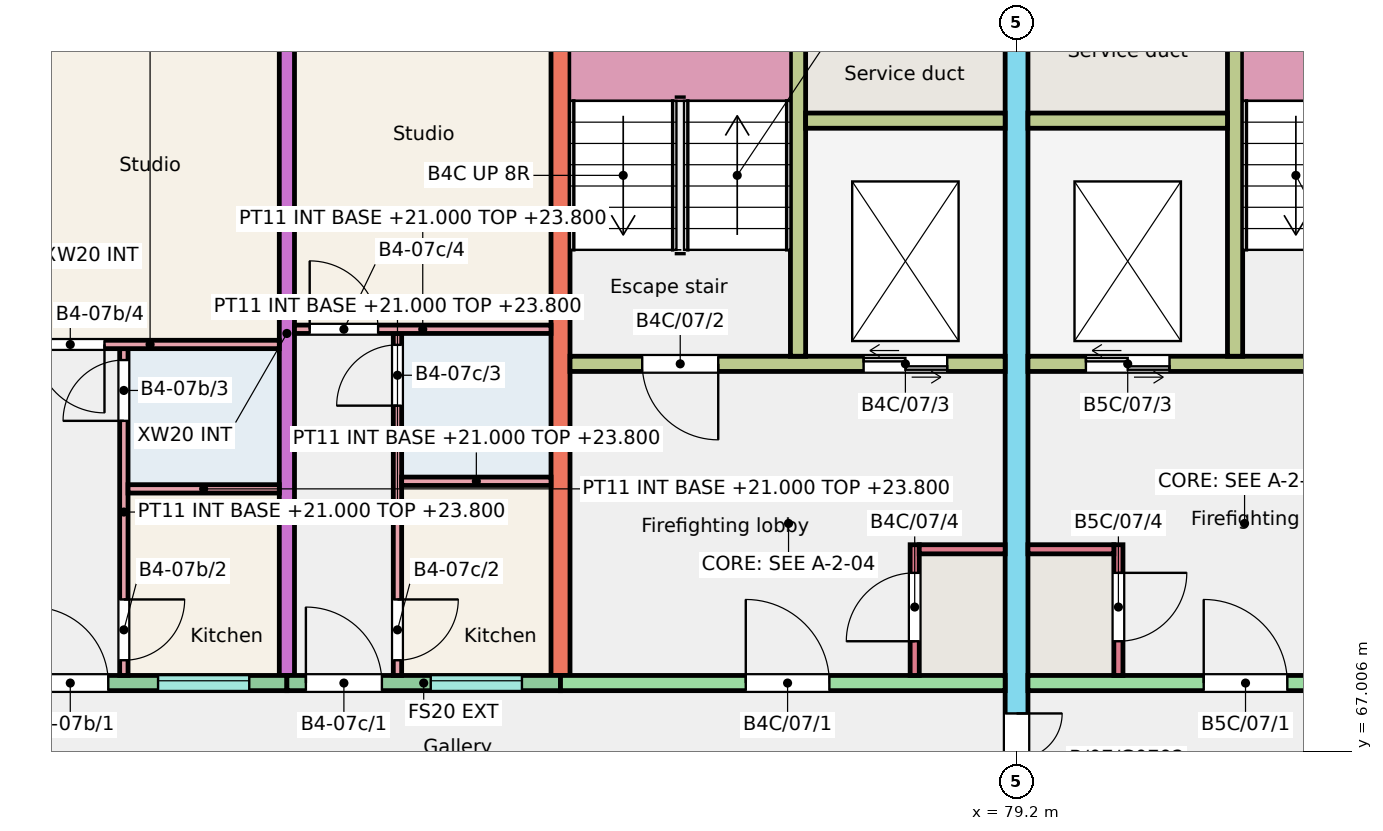
"""IFC4 building model, lengths in metres.
Left out: names, types, materials, properties, quantities, classifications, styles, units other than length and angle.
Written with IfcOpenShell. Run it as: python <this file> out.ifc"""

import sys

from ifc_helpers import new_model, si_unit, direction, frame, frame_2d, origin, place, context, subcontext, project, spatial, rectangle, extrude, element, fill, save


model = new_model("IFC4")
c1 = context("Model", 3, precision=1e-05, world=origin(), true_north=direction((0.0, 1.0)))
c2 = subcontext(c1, "Body", "Model", "MODEL_VIEW")
j1 = project(units=[si_unit("LENGTHUNIT", "METRE"), si_unit("PLANEANGLEUNIT", "RADIAN")], contexts=[c1])
p1 = place(None, origin())
s1 = spatial("IfcSite", under=j1, at=p1, CompositionType="ELEMENT")
p2 = place(p1, origin())
s2 = spatial("IfcBuilding", under=s1, at=p2, CompositionType="ELEMENT")
p3 = place(p2, frame((0.0, 0.0, 21.0)))
s3 = spatial("IfcBuildingStorey", under=s2, at=p3, CompositionType="ELEMENT", Elevation=21.0)
p4 = place(p3, frame((69.6, 68.0, 0.0), z_axis=(0.0, 0.0, 1.0), x_axis=(0.0, 1.0, 0.0)))
e1 = element("IfcWall", 1, at=p4, inside=s3, PredefinedType="SHEAR", context=c2, shape_type="SweptSolid", body=[
    extrude(rectangle(XDim=9.0, YDim=0.2, at=frame_2d((4.5, 0.0))), origin(), (0.0, 0.0, 1.0), 3.0),
])
p5 = place(p3, frame((73.2, 68.0, 0.0), z_axis=(0.0, 0.0, 1.0), x_axis=(0.0, 1.0, 0.0)))
e2 = element("IfcWall", 2, at=p5, inside=s3, PredefinedType="SHEAR", context=c2, shape_type="SweptSolid", body=[
    extrude(rectangle(XDim=9.0, YDim=0.25, at=frame_2d((4.5, 0.0))), origin(), (0.0, 0.0, 1.0), 3.0),
])
p6 = place(p3, frame((79.2, 66.0, 0.0), z_axis=(0.0, 0.0, 1.0), x_axis=(0.0, 1.0, 0.0)))
e3 = element("IfcWall", 3, at=p6, inside=s3, PredefinedType="SHEAR", context=c2, shape_type="SweptSolid", body=[
    extrude(rectangle(XDim=11.0, YDim=0.3, at=frame_2d((5.5, 0.0))), origin(), (0.0, 0.0, 1.0), 3.0),
])
p7 = place(p6, frame((0.3, 0.0, 0.0)))
e4 = element("IfcOpeningElement", 4, at=p7, cuts=e3, PredefinedType="OPENING", context=c2, shape_type="SweptSolid", body=[
    extrude(rectangle(XDim=1.2, YDim=2.1, at=frame_2d((0.6, 1.05))), frame((0.0, 0.16, 0.0), z_axis=(0.0, -1.0, 0.0), x_axis=(1.0, 0.0, 0.0)), (0.0, 0.0, 1.0), 0.32),
])
p8 = place(p3, frame((66.0, 67.9, 0.0), z_axis=(0.0, 0.0, 1.0), x_axis=(1.0, 0.0, 0.0)))
e5 = element("IfcWall", 5, at=p8, inside=s3, PredefinedType="SOLIDWALL", context=c2, shape_type="SweptSolid", body=[
    extrude(rectangle(XDim=3.6, YDim=0.2, at=frame_2d((1.8, 0.0))), origin(), (0.0, 0.0, 1.0), 3.0),
])
p9 = place(p8, frame((1.905, 0.0, 1.1)))
e6 = element("IfcOpeningElement", 6, at=p9, cuts=e5, PredefinedType="OPENING", context=c2, shape_type="SweptSolid", body=[
    extrude(rectangle(XDim=1.2, YDim=1.3, at=frame_2d((0.6, 0.65))), frame((0.0, 0.11, 0.0), z_axis=(0.0, -1.0, 0.0), x_axis=(1.0, 0.0, 0.0)), (0.0, 0.0, 1.0), 0.22),
])
p10 = place(p8, frame((0.25, 0.0, 0.0)))
e7 = element("IfcOpeningElement", 7, at=p10, cuts=e5, PredefinedType="OPENING", context=c2, shape_type="SweptSolid", body=[
    extrude(rectangle(XDim=1.0, YDim=2.1, at=frame_2d((0.5, 1.05))), frame((0.0, 0.11, 0.0), z_axis=(0.0, -1.0, 0.0), x_axis=(1.0, 0.0, 0.0)), (0.0, 0.0, 1.0), 0.22),
])
p11 = place(p3, frame((69.6, 67.9, 0.0), z_axis=(0.0, 0.0, 1.0), x_axis=(1.0, 0.0, 0.0)))
e8 = element("IfcWall", 8, at=p11, inside=s3, PredefinedType="SOLIDWALL", context=c2, shape_type="SweptSolid", body=[
    extrude(rectangle(XDim=3.6, YDim=0.2, at=frame_2d((1.8, 0.0))), origin(), (0.0, 0.0, 1.0), 3.0),
])
p12 = place(p11, frame((1.893, 0.0, 1.1)))
e9 = element("IfcOpeningElement", 9, at=p12, cuts=e8, PredefinedType="OPENING", context=c2, shape_type="SweptSolid", body=[
    extrude(rectangle(XDim=1.2, YDim=1.3, at=frame_2d((0.6, 0.65))), frame((0.0, 0.11, 0.0), z_axis=(0.0, -1.0, 0.0), x_axis=(1.0, 0.0, 0.0)), (0.0, 0.0, 1.0), 0.22),
])
p13 = place(p11, frame((0.25, 0.0, 0.0)))
e10 = element("IfcOpeningElement", 10, at=p13, cuts=e8, PredefinedType="OPENING", context=c2, shape_type="SweptSolid", body=[
    extrude(rectangle(XDim=1.0, YDim=2.1, at=frame_2d((0.5, 1.05))), frame((0.0, 0.11, 0.0), z_axis=(0.0, -1.0, 0.0), x_axis=(1.0, 0.0, 0.0)), (0.0, 0.0, 1.0), 0.22),
])
p14 = place(p3, frame((73.2, 67.9, 0.0), z_axis=(0.0, 0.0, 1.0), x_axis=(1.0, 0.0, 0.0)))
e11 = element("IfcWall", 11, at=p14, inside=s3, PredefinedType="SHEAR", context=c2, shape_type="SweptSolid", body=[
    extrude(rectangle(XDim=5.85, YDim=0.2, at=frame_2d((2.925, 0.0))), origin(), (0.0, 0.0, 1.0), 3.0),
])
p15 = place(p14, frame((2.438, 0.0, 0.0)))
e12 = element("IfcOpeningElement", 12, at=p15, cuts=e11, PredefinedType="OPENING", context=c2, shape_type="SweptSolid", body=[
    extrude(rectangle(XDim=1.1, YDim=2.1, at=frame_2d((0.55, 1.05))), frame((0.0, 0.11, 0.0), z_axis=(0.0, -1.0, 0.0), x_axis=(1.0, 0.0, 0.0)), (0.0, 0.0, 1.0), 0.22),
])
p16 = place(p3, frame((73.325, 72.1, 0.0), z_axis=(0.0, 0.0, 1.0), x_axis=(1.0, 0.0, 0.0)))
e13 = element("IfcWall", 13, at=p16, inside=s3, PredefinedType="SHEAR", context=c2, shape_type="SweptSolid", body=[
    extrude(rectangle(XDim=5.725, YDim=0.2, at=frame_2d((2.863, 0.0))), origin(), (0.0, 0.0, 1.0), 3.0),
])
p17 = place(p16, frame((0.95, 0.0, 0.0)))
e14 = element("IfcOpeningElement", 14, at=p17, cuts=e13, PredefinedType="OPENING", context=c2, shape_type="SweptSolid", body=[
    extrude(rectangle(XDim=1.0, YDim=2.1, at=frame_2d((0.5, 1.05))), frame((0.0, 0.11, 0.0), z_axis=(0.0, -1.0, 0.0), x_axis=(1.0, 0.0, 0.0)), (0.0, 0.0, 1.0), 0.22),
])
p18 = place(p16, frame((3.863, 0.0, 0.0)))
e15 = element("IfcOpeningElement", 15, at=p18, cuts=e13, PredefinedType="OPENING", context=c2, shape_type="SweptSolid", body=[
    extrude(rectangle(XDim=1.1, YDim=2.1, at=frame_2d((0.55, 1.05))), frame((0.0, 0.11, 0.0), z_axis=(0.0, -1.0, 0.0), x_axis=(1.0, 0.0, 0.0)), (0.0, 0.0, 1.0), 0.22),
])
p19 = place(p3, frame((76.325, 72.2, 0.0), z_axis=(0.0, 0.0, 1.0), x_axis=(0.0, 1.0, 0.0)))
e16 = element("IfcWall", 16, at=p19, inside=s3, PredefinedType="SHEAR", context=c2, shape_type="SweptSolid", body=[
    extrude(rectangle(XDim=4.8, YDim=0.2, at=frame_2d((2.4, 0.0))), origin(), (0.0, 0.0, 1.0), 3.0),
])
p20 = place(p3, frame((76.425, 75.3, 0.0), z_axis=(0.0, 0.0, 1.0), x_axis=(1.0, 0.0, 0.0)))
e17 = element("IfcWall", 17, at=p20, inside=s3, PredefinedType="SHEAR", context=c2, shape_type="SweptSolid", body=[
    extrude(rectangle(XDim=2.625, YDim=0.2, at=frame_2d((1.312, 0.0))), origin(), (0.0, 0.0, 1.0), 3.0),
])
p21 = place(p3, frame((77.86, 68.0, 0.0), z_axis=(0.0, 0.0, 1.0), x_axis=(0.0, 1.0, 0.0)))
e18 = element("IfcWall", 18, at=p21, inside=s3, PredefinedType="SHEAR", context=c2, shape_type="SweptSolid", body=[
    extrude(rectangle(XDim=1.72, YDim=0.12, at=frame_2d((0.86, 0.0))), origin(), (0.0, 0.0, 1.0), 3.0),
])
p22 = place(p21, frame((0.45, 0.0, 0.0)))
e19 = element("IfcOpeningElement", 19, at=p22, cuts=e18, PredefinedType="OPENING", context=c2, shape_type="SweptSolid", body=[
    extrude(rectangle(XDim=0.9, YDim=2.1, at=frame_2d((0.45, 1.05))), frame((0.0, 0.07, 0.0), z_axis=(0.0, -1.0, 0.0), x_axis=(1.0, 0.0, 0.0)), (0.0, 0.0, 1.0), 0.14),
])
p23 = place(p3, frame((77.92, 69.66, 0.0), z_axis=(0.0, 0.0, 1.0), x_axis=(1.0, 0.0, 0.0)))
e20 = element("IfcWall", 20, at=p23, inside=s3, PredefinedType="SHEAR", context=c2, shape_type="SweptSolid", body=[
    extrude(rectangle(XDim=1.13, YDim=0.12, at=frame_2d((0.565, 0.0))), origin(), (0.0, 0.0, 1.0), 3.0),
])
p24 = place(p3, frame((79.35, 67.9, 0.0), z_axis=(0.0, 0.0, 1.0), x_axis=(1.0, 0.0, 0.0)))
e21 = element("IfcWall", 21, at=p24, inside=s3, PredefinedType="SHEAR", context=c2, shape_type="SweptSolid", body=[
    extrude(rectangle(XDim=5.85, YDim=0.2, at=frame_2d((2.925, 0.0))), origin(), (0.0, 0.0, 1.0), 3.0),
])
p25 = place(p24, frame((2.312, 0.0, 0.0)))
e22 = element("IfcOpeningElement", 22, at=p25, cuts=e21, PredefinedType="OPENING", context=c2, shape_type="SweptSolid", body=[
    extrude(rectangle(XDim=1.1, YDim=2.1, at=frame_2d((0.55, 1.05))), frame((0.0, 0.11, 0.0), z_axis=(0.0, -1.0, 0.0), x_axis=(1.0, 0.0, 0.0)), (0.0, 0.0, 1.0), 0.22),
])
p26 = place(p3, frame((79.35, 72.1, 0.0), z_axis=(0.0, 0.0, 1.0), x_axis=(1.0, 0.0, 0.0)))
e23 = element("IfcWall", 23, at=p26, inside=s3, PredefinedType="SHEAR", context=c2, shape_type="SweptSolid", body=[
    extrude(rectangle(XDim=5.725, YDim=0.2, at=frame_2d((2.862, 0.0))), origin(), (0.0, 0.0, 1.0), 3.0),
])
p27 = place(p26, frame((3.775, 0.0, 0.0)))
e24 = element("IfcOpeningElement", 24, at=p27, cuts=e23, PredefinedType="OPENING", context=c2, shape_type="SweptSolid", body=[
    extrude(rectangle(XDim=1.0, YDim=2.1, at=frame_2d((0.5, 1.05))), frame((0.0, 0.11, 0.0), z_axis=(0.0, -1.0, 0.0), x_axis=(1.0, 0.0, 0.0)), (0.0, 0.0, 1.0), 0.22),
])
p28 = place(p26, frame((0.762, 0.0, 0.0)))
e25 = element("IfcOpeningElement", 25, at=p28, cuts=e23, PredefinedType="OPENING", context=c2, shape_type="SweptSolid", body=[
    extrude(rectangle(XDim=1.1, YDim=2.1, at=frame_2d((0.55, 1.05))), frame((0.0, 0.11, 0.0), z_axis=(0.0, -1.0, 0.0), x_axis=(1.0, 0.0, 0.0)), (0.0, 0.0, 1.0), 0.22),
])
p29 = place(p3, frame((82.075, 72.2, 0.0), z_axis=(0.0, 0.0, 1.0), x_axis=(0.0, 1.0, 0.0)))
e26 = element("IfcWall", 26, at=p29, inside=s3, PredefinedType="SHEAR", context=c2, shape_type="SweptSolid", body=[
    extrude(rectangle(XDim=4.8, YDim=0.2, at=frame_2d((2.4, 0.0))), origin(), (0.0, 0.0, 1.0), 3.0),
])
p30 = place(p3, frame((79.35, 75.3, 0.0), z_axis=(0.0, 0.0, 1.0), x_axis=(1.0, 0.0, 0.0)))
e27 = element("IfcWall", 27, at=p30, inside=s3, PredefinedType="SHEAR", context=c2, shape_type="SweptSolid", body=[
    extrude(rectangle(XDim=2.625, YDim=0.2, at=frame_2d((1.312, 0.0))), origin(), (0.0, 0.0, 1.0), 3.0),
])
p31 = place(p3, frame((80.54, 68.0, 0.0), z_axis=(0.0, 0.0, 1.0), x_axis=(0.0, 1.0, 0.0)))
e28 = element("IfcWall", 28, at=p31, inside=s3, PredefinedType="SHEAR", context=c2, shape_type="SweptSolid", body=[
    extrude(rectangle(XDim=1.72, YDim=0.12, at=frame_2d((0.86, 0.0))), origin(), (0.0, 0.0, 1.0), 3.0),
])
p32 = place(p31, frame((0.45, 0.0, 0.0)))
e29 = element("IfcOpeningElement", 29, at=p32, cuts=e28, PredefinedType="OPENING", context=c2, shape_type="SweptSolid", body=[
    extrude(rectangle(XDim=0.9, YDim=2.1, at=frame_2d((0.45, 1.05))), frame((0.0, 0.07, 0.0), z_axis=(0.0, -1.0, 0.0), x_axis=(1.0, 0.0, 0.0)), (0.0, 0.0, 1.0), 0.14),
])
p33 = place(p3, frame((79.35, 69.66, 0.0), z_axis=(0.0, 0.0, 1.0), x_axis=(1.0, 0.0, 0.0)))
e30 = element("IfcWall", 30, at=p33, inside=s3, PredefinedType="SHEAR", context=c2, shape_type="SweptSolid", body=[
    extrude(rectangle(XDim=1.13, YDim=0.12, at=frame_2d((0.565, 0.0))), origin(), (0.0, 0.0, 1.0), 3.0),
])
p34 = place(p3, frame((67.455, 68.0, 0.0), z_axis=(0.0, 0.0, 1.0), x_axis=(0.0, 1.0, 0.0)))
e31 = element("IfcWall", 31, at=p34, inside=s3, PredefinedType="PARTITIONING", context=c2, shape_type="SweptSolid", body=[
    extrude(rectangle(XDim=4.3, YDim=0.11, at=frame_2d((2.15, 0.0))), origin(), (0.0, 0.0, 1.0), 2.8),
])
p35 = place(p34, frame((0.2, 0.0, 0.0)))
e32 = element("IfcOpeningElement", 32, at=p35, cuts=e31, PredefinedType="OPENING", context=c2, shape_type="SweptSolid", body=[
    extrude(rectangle(XDim=0.8, YDim=2.1, at=frame_2d((0.4, 1.05))), frame((0.0, 0.065, 0.0), z_axis=(0.0, -1.0, 0.0), x_axis=(1.0, 0.0, 0.0)), (0.0, 0.0, 1.0), 0.13),
])
p36 = place(p34, frame((3.35, 0.0, 0.0)))
e33 = element("IfcOpeningElement", 33, at=p36, cuts=e31, PredefinedType="OPENING", context=c2, shape_type="SweptSolid", body=[
    extrude(rectangle(XDim=0.8, YDim=2.1, at=frame_2d((0.4, 1.05))), frame((0.0, 0.065, 0.0), z_axis=(0.0, -1.0, 0.0), x_axis=(1.0, 0.0, 0.0)), (0.0, 0.0, 1.0), 0.13),
])
p37 = place(p3, frame((67.51, 70.455, 0.0), z_axis=(0.0, 0.0, 1.0), x_axis=(1.0, 0.0, 0.0)))
e34 = element("IfcWall", 34, at=p37, inside=s3, PredefinedType="PARTITIONING", context=c2, shape_type="SweptSolid", body=[
    extrude(rectangle(XDim=1.99, YDim=0.11, at=frame_2d((0.995, 0.0))), origin(), (0.0, 0.0, 1.0), 2.8),
])
p38 = place(p3, frame((66.1, 72.355, 0.0), z_axis=(0.0, 0.0, 1.0), x_axis=(1.0, 0.0, 0.0)))
e35 = element("IfcWall", 35, at=p38, inside=s3, PredefinedType="PARTITIONING", context=c2, shape_type="SweptSolid", body=[
    extrude(rectangle(XDim=3.4, YDim=0.11, at=frame_2d((1.7, 0.0))), origin(), (0.0, 0.0, 1.0), 2.8),
])
p39 = place(p38, frame((0.2, 0.0, 0.0)))
e36 = element("IfcOpeningElement", 36, at=p39, cuts=e35, PredefinedType="OPENING", context=c2, shape_type="SweptSolid", body=[
    extrude(rectangle(XDim=0.9, YDim=2.1, at=frame_2d((0.45, 1.05))), frame((0.0, 0.065, 0.0), z_axis=(0.0, -1.0, 0.0), x_axis=(1.0, 0.0, 0.0)), (0.0, 0.0, 1.0), 0.13),
])
p40 = place(p3, frame((71.055, 68.0, 0.0), z_axis=(0.0, 0.0, 1.0), x_axis=(0.0, 1.0, 0.0)))
e37 = element("IfcWall", 37, at=p40, inside=s3, PredefinedType="PARTITIONING", context=c2, shape_type="SweptSolid", body=[
    extrude(rectangle(XDim=4.5, YDim=0.11, at=frame_2d((2.25, 0.0))), origin(), (0.0, 0.0, 1.0), 2.8),
])
p41 = place(p40, frame((0.2, 0.0, 0.0)))
e38 = element("IfcOpeningElement", 38, at=p41, cuts=e37, PredefinedType="OPENING", context=c2, shape_type="SweptSolid", body=[
    extrude(rectangle(XDim=0.8, YDim=2.1, at=frame_2d((0.4, 1.05))), frame((0.0, 0.065, 0.0), z_axis=(0.0, -1.0, 0.0), x_axis=(1.0, 0.0, 0.0)), (0.0, 0.0, 1.0), 0.13),
])
p42 = place(p40, frame((3.55, 0.0, 0.0)))
e39 = element("IfcOpeningElement", 39, at=p42, cuts=e37, PredefinedType="OPENING", context=c2, shape_type="SweptSolid", body=[
    extrude(rectangle(XDim=0.8, YDim=2.1, at=frame_2d((0.4, 1.05))), frame((0.0, 0.065, 0.0), z_axis=(0.0, -1.0, 0.0), x_axis=(1.0, 0.0, 0.0)), (0.0, 0.0, 1.0), 0.13),
])
p43 = place(p3, frame((71.11, 70.555, 0.0), z_axis=(0.0, 0.0, 1.0), x_axis=(1.0, 0.0, 0.0)))
e40 = element("IfcWall", 40, at=p43, inside=s3, PredefinedType="PARTITIONING", context=c2, shape_type="SweptSolid", body=[
    extrude(rectangle(XDim=1.965, YDim=0.11, at=frame_2d((0.982, 0.0))), origin(), (0.0, 0.0, 1.0), 2.8),
])
p44 = place(p3, frame((69.7, 72.555, 0.0), z_axis=(0.0, 0.0, 1.0), x_axis=(1.0, 0.0, 0.0)))
e41 = element("IfcWall", 41, at=p44, inside=s3, PredefinedType="PARTITIONING", context=c2, shape_type="SweptSolid", body=[
    extrude(rectangle(XDim=3.375, YDim=0.11, at=frame_2d((1.688, 0.0))), origin(), (0.0, 0.0, 1.0), 2.8),
])
p45 = place(p44, frame((0.2, 0.0, 0.0)))
e42 = element("IfcOpeningElement", 42, at=p45, cuts=e41, PredefinedType="OPENING", context=c2, shape_type="SweptSolid", body=[
    extrude(rectangle(XDim=0.9, YDim=2.1, at=frame_2d((0.45, 1.05))), frame((0.0, 0.065, 0.0), z_axis=(0.0, -1.0, 0.0), x_axis=(1.0, 0.0, 0.0)), (0.0, 0.0, 1.0), 0.13),
])
p46 = place(p9, origin())
e43 = element("IfcWindow", 43, at=p46, inside=s3, PartitioningType="SINGLE_PANEL", PredefinedType="WINDOW", context=c2, shape_type="SweptSolid", body=[
    extrude(rectangle(XDim=1.2, YDim=1.3, at=frame_2d((0.6, 0.65))), frame((0.0, 0.06, 0.0), z_axis=(0.0, -1.0, 0.0), x_axis=(1.0, 0.0, 0.0)), (0.0, 0.0, 1.0), 0.06),
])
fill(e6, e43)
p47 = place(p12, origin())
e44 = element("IfcWindow", 44, at=p47, inside=s3, PartitioningType="SINGLE_PANEL", PredefinedType="WINDOW", context=c2, shape_type="SweptSolid", body=[
    extrude(rectangle(XDim=1.2, YDim=1.3, at=frame_2d((0.6, 0.65))), frame((0.0, 0.06, 0.0), z_axis=(0.0, -1.0, 0.0), x_axis=(1.0, 0.0, 0.0)), (0.0, 0.0, 1.0), 0.06),
])
fill(e9, e44)
p48 = place(p10, origin())
e45 = element("IfcDoor", 45, at=p48, inside=s3, OperationType="SINGLE_SWING_LEFT", PredefinedType="DOOR", context=c2, shape_type="SweptSolid", body=[
    extrude(rectangle(XDim=1.0, YDim=2.1, at=frame_2d((0.5, 1.05))), frame((0.0, 0.025, 0.0), z_axis=(0.0, -1.0, 0.0), x_axis=(1.0, 0.0, 0.0)), (0.0, 0.0, 1.0), 0.05),
])
fill(e7, e45)
p49 = place(p35, origin())
e46 = element("IfcDoor", 46, at=p49, inside=s3, OperationType="SINGLE_SWING_RIGHT", PredefinedType="DOOR", context=c2, shape_type="SweptSolid", body=[
    extrude(rectangle(XDim=0.8, YDim=2.1, at=frame_2d((0.4, 1.05))), frame((0.0, 0.025, 0.0), z_axis=(0.0, -1.0, 0.0), x_axis=(1.0, 0.0, 0.0)), (0.0, 0.0, 1.0), 0.05),
])
fill(e32, e46)
p50 = place(p36, origin())
e47 = element("IfcDoor", 47, at=p50, inside=s3, OperationType="SINGLE_SWING_LEFT", PredefinedType="DOOR", context=c2, shape_type="SweptSolid", body=[
    extrude(rectangle(XDim=0.8, YDim=2.1, at=frame_2d((0.4, 1.05))), frame((0.0, 0.025, 0.0), z_axis=(0.0, -1.0, 0.0), x_axis=(1.0, 0.0, 0.0)), (0.0, 0.0, 1.0), 0.05),
])
fill(e33, e47)
p51 = place(p39, origin())
e48 = element("IfcDoor", 48, at=p51, inside=s3, OperationType="SINGLE_SWING_RIGHT", PredefinedType="DOOR", context=c2, shape_type="SweptSolid", body=[
    extrude(rectangle(XDim=0.9, YDim=2.1, at=frame_2d((0.45, 1.05))), frame((0.0, 0.025, 0.0), z_axis=(0.0, -1.0, 0.0), x_axis=(1.0, 0.0, 0.0)), (0.0, 0.0, 1.0), 0.05),
])
fill(e36, e48)
p52 = place(p13, origin())
e49 = element("IfcDoor", 49, at=p52, inside=s3, OperationType="SINGLE_SWING_LEFT", PredefinedType="DOOR", context=c2, shape_type="SweptSolid", body=[
    extrude(rectangle(XDim=1.0, YDim=2.1, at=frame_2d((0.5, 1.05))), frame((0.0, 0.025, 0.0), z_axis=(0.0, -1.0, 0.0), x_axis=(1.0, 0.0, 0.0)), (0.0, 0.0, 1.0), 0.05),
])
fill(e10, e49)
p53 = place(p41, origin())
e50 = element("IfcDoor", 50, at=p53, inside=s3, OperationType="SINGLE_SWING_RIGHT", PredefinedType="DOOR", context=c2, shape_type="SweptSolid", body=[
    extrude(rectangle(XDim=0.8, YDim=2.1, at=frame_2d((0.4, 1.05))), frame((0.0, 0.025, 0.0), z_axis=(0.0, -1.0, 0.0), x_axis=(1.0, 0.0, 0.0)), (0.0, 0.0, 1.0), 0.05),
])
fill(e38, e50)
p54 = place(p42, origin())
e51 = element("IfcDoor", 51, at=p54, inside=s3, OperationType="SINGLE_SWING_LEFT", PredefinedType="DOOR", context=c2, shape_type="SweptSolid", body=[
    extrude(rectangle(XDim=0.8, YDim=2.1, at=frame_2d((0.4, 1.05))), frame((0.0, 0.025, 0.0), z_axis=(0.0, -1.0, 0.0), x_axis=(1.0, 0.0, 0.0)), (0.0, 0.0, 1.0), 0.05),
])
fill(e39, e51)
p55 = place(p45, origin())
e52 = element("IfcDoor", 52, at=p55, inside=s3, OperationType="SINGLE_SWING_LEFT", PredefinedType="DOOR", context=c2, shape_type="SweptSolid", body=[
    extrude(rectangle(XDim=0.9, YDim=2.1, at=frame_2d((0.45, 1.05))), frame((0.0, 0.025, 0.0), z_axis=(0.0, -1.0, 0.0), x_axis=(1.0, 0.0, 0.0)), (0.0, 0.0, 1.0), 0.05),
])
fill(e42, e52)
p56 = place(p15, origin())
e53 = element("IfcDoor", 53, at=p56, inside=s3, OperationType="SINGLE_SWING_LEFT", PredefinedType="DOOR", context=c2, shape_type="SweptSolid", body=[
    extrude(rectangle(XDim=1.1, YDim=2.1, at=frame_2d((0.55, 1.05))), frame((0.0, 0.025, 0.0), z_axis=(0.0, -1.0, 0.0), x_axis=(1.0, 0.0, 0.0)), (0.0, 0.0, 1.0), 0.05),
])
fill(e12, e53)
p57 = place(p17, origin())
e54 = element("IfcDoor", 54, at=p57, inside=s3, OperationType="SINGLE_SWING_RIGHT", PredefinedType="DOOR", context=c2, shape_type="SweptSolid", body=[
    extrude(rectangle(XDim=1.0, YDim=2.1, at=frame_2d((0.5, 1.05))), frame((0.0, 0.025, 0.0), z_axis=(0.0, -1.0, 0.0), x_axis=(1.0, 0.0, 0.0)), (0.0, 0.0, 1.0), 0.05),
])
fill(e14, e54)
p58 = place(p18, origin())
e55 = element("IfcDoor", 55, at=p58, inside=s3, OperationType="DOUBLE_DOOR_SLIDING", PredefinedType="DOOR", context=c2, shape_type="SweptSolid", body=[
    extrude(rectangle(XDim=1.1, YDim=2.1, at=frame_2d((0.55, 1.05))), frame((0.0, 0.025, 0.0), z_axis=(0.0, -1.0, 0.0), x_axis=(1.0, 0.0, 0.0)), (0.0, 0.0, 1.0), 0.05),
])
fill(e15, e55)
p59 = place(p22, origin())
e56 = element("IfcDoor", 56, at=p59, inside=s3, OperationType="SINGLE_SWING_LEFT", PredefinedType="DOOR", context=c2, shape_type="SweptSolid", body=[
    extrude(rectangle(XDim=0.9, YDim=2.1, at=frame_2d((0.45, 1.05))), frame((0.0, 0.025, 0.0), z_axis=(0.0, -1.0, 0.0), x_axis=(1.0, 0.0, 0.0)), (0.0, 0.0, 1.0), 0.05),
])
fill(e19, e56)
p60 = place(p25, origin())
e57 = element("IfcDoor", 57, at=p60, inside=s3, OperationType="SINGLE_SWING_LEFT", PredefinedType="DOOR", context=c2, shape_type="SweptSolid", body=[
    extrude(rectangle(XDim=1.1, YDim=2.1, at=frame_2d((0.55, 1.05))), frame((0.0, 0.025, 0.0), z_axis=(0.0, -1.0, 0.0), x_axis=(1.0, 0.0, 0.0)), (0.0, 0.0, 1.0), 0.05),
])
fill(e22, e57)
p61 = place(p28, origin())
e58 = element("IfcDoor", 58, at=p61, inside=s3, OperationType="DOUBLE_DOOR_SLIDING", PredefinedType="DOOR", context=c2, shape_type="SweptSolid", body=[
    extrude(rectangle(XDim=1.1, YDim=2.1, at=frame_2d((0.55, 1.05))), frame((0.0, 0.025, 0.0), z_axis=(0.0, -1.0, 0.0), x_axis=(1.0, 0.0, 0.0)), (0.0, 0.0, 1.0), 0.05),
])
fill(e25, e58)
p62 = place(p32, origin())
e59 = element("IfcDoor", 59, at=p62, inside=s3, OperationType="SINGLE_SWING_RIGHT", PredefinedType="DOOR", context=c2, shape_type="SweptSolid", body=[
    extrude(rectangle(XDim=0.9, YDim=2.1, at=frame_2d((0.45, 1.05))), frame((0.0, 0.025, 0.0), z_axis=(0.0, -1.0, 0.0), x_axis=(1.0, 0.0, 0.0)), (0.0, 0.0, 1.0), 0.05),
])
fill(e29, e59)
p63 = place(p7, origin())
e60 = element("IfcDoor", 60, at=p63, inside=s3, OperationType="DOUBLE_DOOR_SINGLE_SWING", PredefinedType="DOOR", context=c2, shape_type="SweptSolid", body=[
    extrude(rectangle(XDim=1.2, YDim=2.1, at=frame_2d((0.6, 1.05))), frame((0.0, 0.025, 0.0), z_axis=(0.0, -1.0, 0.0), x_axis=(1.0, 0.0, 0.0)), (0.0, 0.0, 1.0), 0.05),
])
fill(e4, e60)
save(model, sys.argv[1])
